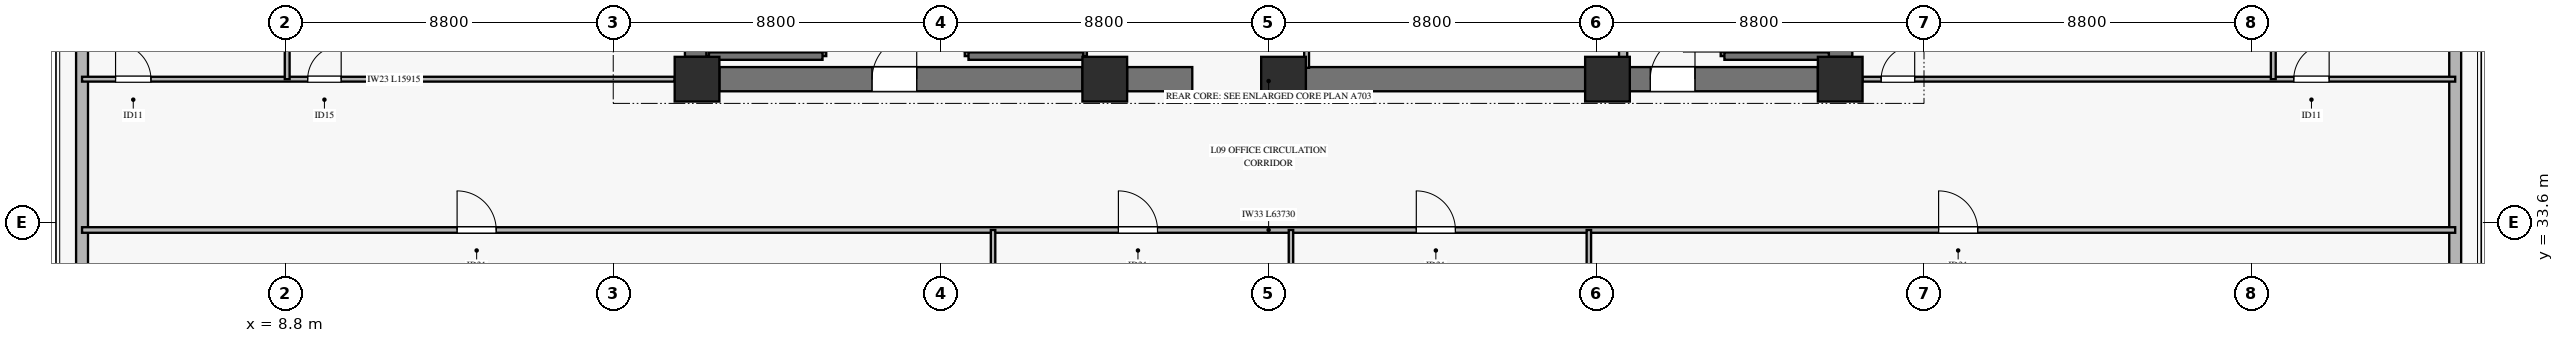
"""IFC4 building model, lengths in metres.
Left out: names, types, materials, properties, quantities, classifications, styles, units other than length and angle.
Written with IfcOpenShell. Run it as: python <this file> out.ifc"""

import sys

from ifc_helpers import new_model, si_unit, direction, frame, frame_2d, origin, origin_2d, place, context, subcontext, project, spatial, rectangle, extrude, source, transform, mapped, element, fill, save


model = new_model("IFC4")
c1 = context("Model", 3, precision=1e-05, world=origin(), true_north=direction((0.0, 1.0)))
c2 = subcontext(c1, "Body", "Model", "MODEL_VIEW")
j1 = project(units=[si_unit("LENGTHUNIT", "METRE"), si_unit("PLANEANGLEUNIT", "RADIAN")], contexts=[c1])
p1 = place(None, origin())
s1 = spatial("IfcSite", under=j1, at=p1, CompositionType="ELEMENT")
p2 = place(p1, origin())
s2 = spatial("IfcBuilding", under=s1, at=p2, CompositionType="ELEMENT")
p3 = place(p2, frame((0.0, 0.0, 37.1)))
s3 = spatial("IfcBuildingStorey", under=s2, at=p3, CompositionType="ELEMENT", Elevation=37.1)
m1 = source(origin(), c2, "Body", "SweptSolid", [
    extrude(rectangle(XDim=1.2, YDim=1.2, at=origin_2d()), origin(), (0.0, 0.0, 1.0), 3.68),
])
for number, where, z_axis, x_axis in (
    (1, (19.85, 37.45, 0.0), (0.0, 0.0, 1.0), (1.0, 0.0, 0.0)),
    (2, (30.8, 37.45, 0.0), (0.0, 0.0, 1.0), (1.0, 0.0, 0.0)),
    (3, (35.6, 37.45, 0.0), (0.0, 0.0, 1.0), (1.0, 0.0, 0.0)),
    (4, (44.3, 37.45, 0.0), (0.0, 0.0, 1.0), (1.0, 0.0, 0.0)),
    (5, (50.55, 37.45, 0.0), (0.0, 0.0, 1.0), (1.0, 0.0, 0.0)),
):
    element("IfcColumn", number, at=place(p3, frame(where, z_axis=z_axis, x_axis=x_axis)), inside=s3, PredefinedType="PILASTER", context=c2, shape_type="MappedRepresentation", body=[
        mapped(m1, transform((0.0, 0.0, 0.0), x_axis=(1.0, 0.0, 0.0), y_axis=(0.0, 1.0, 0.0), z_axis=(0.0, 0.0, 1.0), scale=1.0)),
    ])
p4 = place(p3, frame((20.45, 37.45, 0.0), z_axis=(0.0, 0.0, 1.0), x_axis=(1.0, 0.0, 0.0)))
e6 = element("IfcWall", 6, at=p4, inside=s3, PredefinedType="SHEAR", context=c2, shape_type="SweptSolid", body=[
    extrude(rectangle(XDim=9.75, YDim=0.65, at=frame_2d((4.875, 0.0))), origin(), (0.0, 0.0, 1.0), 3.68),
])
p5 = place(p4, frame((4.1, 0.0, 0.0)))
e7 = element("IfcOpeningElement", 7, at=p5, cuts=e6, PredefinedType="OPENING", context=c2, shape_type="SweptSolid", body=[
    extrude(rectangle(XDim=1.2, YDim=2.15, at=frame_2d((0.6, 1.075))), frame((0.0, 0.335, 0.0), z_axis=(0.0, -1.0, 0.0), x_axis=(1.0, 0.0, 0.0)), (0.0, 0.0, 1.0), 0.67),
])
p6 = place(p3, frame((31.4, 37.45, 0.0), z_axis=(0.0, 0.0, 1.0), x_axis=(1.0, 0.0, 0.0)))
e8 = element("IfcWall", 8, at=p6, inside=s3, PredefinedType="SHEAR", context=c2, shape_type="SweptSolid", body=[
    extrude(rectangle(XDim=1.75, YDim=0.65, at=frame_2d((0.875, 0.0))), origin(), (0.0, 0.0, 1.0), 3.68),
])
p7 = place(p3, frame((36.2, 37.45, 0.0), z_axis=(0.0, 0.0, 1.0), x_axis=(1.0, 0.0, 0.0)))
e9 = element("IfcWall", 9, at=p7, inside=s3, PredefinedType="SHEAR", context=c2, shape_type="SweptSolid", body=[
    extrude(rectangle(XDim=7.5, YDim=0.65, at=frame_2d((3.75, 0.0))), origin(), (0.0, 0.0, 1.0), 3.68),
])
p8 = place(p3, frame((44.9, 37.45, 0.0), z_axis=(0.0, 0.0, 1.0), x_axis=(1.0, 0.0, 0.0)))
e10 = element("IfcWall", 10, at=p8, inside=s3, PredefinedType="SHEAR", context=c2, shape_type="SweptSolid", body=[
    extrude(rectangle(XDim=5.05, YDim=0.65, at=frame_2d((2.525, 0.0))), origin(), (0.0, 0.0, 1.0), 3.68),
])
p9 = place(p8, frame((0.55, 0.0, 0.0)))
e11 = element("IfcOpeningElement", 11, at=p9, cuts=e10, PredefinedType="OPENING", context=c2, shape_type="SweptSolid", body=[
    extrude(rectangle(XDim=1.2, YDim=2.15, at=frame_2d((0.6, 1.075))), frame((0.0, 0.335, 0.0), z_axis=(0.0, -1.0, 0.0), x_axis=(1.0, 0.0, 0.0)), (0.0, 0.0, 1.0), 0.67),
])
for number, where, z_axis, x_axis in (
    (12, (19.85, 38.05, 0.0), (0.0, 0.0, 1.0), (0.0, 1.0, 0.0)),
    (13, (50.55, 38.05, 0.0), (0.0, 0.0, 1.0), (0.0, 1.0, 0.0)),
):
    element("IfcWall", number, at=place(p3, frame(where, z_axis=z_axis, x_axis=x_axis)), inside=s3, PredefinedType="SHEAR", context=c2, shape_type="SweptSolid", body=[
        extrude(rectangle(XDim=7.9, YDim=0.65, at=frame_2d((3.95, 0.0))), origin(), (0.0, 0.0, 1.0), 3.68),
    ])
p10 = place(p3, frame((3.335, 25.513, 0.0), z_axis=(0.0, 0.0, 1.0), x_axis=(0.0, 1.0, 0.0)))
e14 = element("IfcWall", 14, at=p10, inside=s3, PredefinedType="SOLIDWALL", context=c2, shape_type="SweptSolid", body=[
    extrude(rectangle(XDim=17.413, YDim=0.32, at=frame_2d((8.707, 0.0))), origin(), (0.0, 0.0, 1.0), 3.16),
])
p11 = place(p10, frame((4.356, 0.0, 0.45)))
e15 = element("IfcOpeningElement", 15, at=p11, cuts=e14, PredefinedType="OPENING", context=c2, shape_type="SweptSolid", body=[
    extrude(rectangle(XDim=2.4, YDim=2.1, at=frame_2d((1.2, 1.05))), frame((0.0, 0.17, 0.0), z_axis=(0.0, -1.0, 0.0), x_axis=(1.0, 0.0, 0.0)), (0.0, 0.0, 1.0), 0.34),
])
p12 = place(p3, frame((67.065, 25.513, 0.0), z_axis=(0.0, 0.0, 1.0), x_axis=(0.0, 1.0, 0.0)))
e16 = element("IfcWall", 16, at=p12, inside=s3, PredefinedType="SOLIDWALL", context=c2, shape_type="SweptSolid", body=[
    extrude(rectangle(XDim=17.413, YDim=0.32, at=frame_2d((8.707, 0.0))), origin(), (0.0, 0.0, 1.0), 3.16),
])
p13 = place(p12, frame((4.356, 0.0, 0.45)))
e17 = element("IfcOpeningElement", 17, at=p13, cuts=e16, PredefinedType="OPENING", context=c2, shape_type="SweptSolid", body=[
    extrude(rectangle(XDim=2.4, YDim=2.1, at=frame_2d((1.2, 1.05))), frame((0.0, 0.17, 0.0), z_axis=(0.0, -1.0, 0.0), x_axis=(1.0, 0.0, 0.0)), (0.0, 0.0, 1.0), 0.34),
])
p14 = place(p3, frame((20.17, 38.07, 0.0), z_axis=(0.0, 0.0, 1.0), x_axis=(0.0, 1.0, 0.0)))
e18 = element("IfcWall", 18, at=p14, inside=s3, PredefinedType="SOLIDWALL", context=c2, shape_type="SweptSolid", body=[
    extrude(rectangle(XDim=7.25, YDim=0.14, at=frame_2d((3.625, 0.0))), origin(), (0.0, 0.0, 1.0), 3.9),
])
p15 = place(p3, frame((23.22, 38.07, 0.0), z_axis=(0.0, 0.0, 1.0), x_axis=(0.0, 1.0, 0.0)))
e19 = element("IfcWall", 19, at=p15, inside=s3, PredefinedType="SOLIDWALL", context=c2, shape_type="SweptSolid", body=[
    extrude(rectangle(XDim=7.25, YDim=0.2, at=frame_2d((3.625, 0.0))), origin(), (0.0, 0.0, 1.0), 3.9),
])
p16 = place(p15, frame((0.11, 0.0, 0.0)))
e20 = element("IfcOpeningElement", 20, at=p16, cuts=e19, PredefinedType="OPENING", context=c2, shape_type="SweptSolid", body=[
    extrude(rectangle(XDim=1.1, YDim=2.15, at=frame_2d((0.55, 1.075))), frame((0.0, 0.11, 0.0), z_axis=(0.0, -1.0, 0.0), x_axis=(1.0, 0.0, 0.0)), (0.0, 0.0, 1.0), 0.22),
])
p17 = place(p3, frame((20.17, 38.07, 0.0), z_axis=(0.0, 0.0, 1.0), x_axis=(1.0, 0.0, 0.0)))
e21 = element("IfcWall", 21, at=p17, inside=s3, PredefinedType="SOLIDWALL", context=c2, shape_type="SweptSolid", body=[
    extrude(rectangle(XDim=3.05, YDim=0.2, at=frame_2d((1.525, 0.0))), origin(), (0.0, 0.0, 1.0), 3.9),
])
p18 = place(p3, frame((27.14, 38.07, 0.0), z_axis=(0.0, 0.0, 1.0), x_axis=(0.0, 1.0, 0.0)))
e22 = element("IfcWall", 22, at=p18, inside=s3, PredefinedType="SOLIDWALL", context=c2, shape_type="SweptSolid", body=[
    extrude(rectangle(XDim=7.25, YDim=0.2, at=frame_2d((3.625, 0.0))), origin(), (0.0, 0.0, 1.0), 3.9),
])
p19 = place(p18, frame((0.11, 0.0, 0.0)))
e23 = element("IfcOpeningElement", 23, at=p19, cuts=e22, PredefinedType="OPENING", context=c2, shape_type="SweptSolid", body=[
    extrude(rectangle(XDim=1.1, YDim=2.15, at=frame_2d((0.55, 1.075))), frame((0.0, 0.11, 0.0), z_axis=(0.0, -1.0, 0.0), x_axis=(1.0, 0.0, 0.0)), (0.0, 0.0, 1.0), 0.22),
])
p20 = place(p3, frame((30.22, 38.07, 0.0), z_axis=(0.0, 0.0, 1.0), x_axis=(0.0, 1.0, 0.0)))
e24 = element("IfcWall", 24, at=p20, inside=s3, PredefinedType="SOLIDWALL", context=c2, shape_type="SweptSolid", body=[
    extrude(rectangle(XDim=7.25, YDim=0.2, at=frame_2d((3.625, 0.0))), origin(), (0.0, 0.0, 1.0), 3.9),
])
p21 = place(p3, frame((27.14, 38.07, 0.0), z_axis=(0.0, 0.0, 1.0), x_axis=(1.0, 0.0, 0.0)))
e25 = element("IfcWall", 25, at=p21, inside=s3, PredefinedType="SOLIDWALL", context=c2, shape_type="SweptSolid", body=[
    extrude(rectangle(XDim=3.08, YDim=0.2, at=frame_2d((1.54, 0.0))), origin(), (0.0, 0.0, 1.0), 3.9),
])
p22 = place(p3, frame((47.44, 38.07, 0.0), z_axis=(0.0, 0.0, 1.0), x_axis=(0.0, 1.0, 0.0)))
e26 = element("IfcWall", 26, at=p22, inside=s3, PredefinedType="SOLIDWALL", context=c2, shape_type="SweptSolid", body=[
    extrude(rectangle(XDim=7.25, YDim=0.2, at=frame_2d((3.625, 0.0))), origin(), (0.0, 0.0, 1.0), 3.9),
])
p23 = place(p22, frame((0.11, 0.0, 0.0)))
e27 = element("IfcOpeningElement", 27, at=p23, cuts=e26, PredefinedType="OPENING", context=c2, shape_type="SweptSolid", body=[
    extrude(rectangle(XDim=1.1, YDim=2.15, at=frame_2d((0.55, 1.075))), frame((0.0, 0.11, 0.0), z_axis=(0.0, -1.0, 0.0), x_axis=(1.0, 0.0, 0.0)), (0.0, 0.0, 1.0), 0.22),
])
p24 = place(p3, frame((47.44, 38.07, 0.0), z_axis=(0.0, 0.0, 1.0), x_axis=(1.0, 0.0, 0.0)))
e28 = element("IfcWall", 28, at=p24, inside=s3, PredefinedType="SOLIDWALL", context=c2, shape_type="SweptSolid", body=[
    extrude(rectangle(XDim=2.805, YDim=0.2, at=frame_2d((1.403, 0.0))), origin(), (0.0, 0.0, 1.0), 3.9),
])
p25 = place(p3, frame((44.72, 37.755, 0.0), z_axis=(0.0, 0.0, 1.0), x_axis=(0.0, 1.0, 0.0)))
e29 = element("IfcWall", 29, at=p25, inside=s3, PredefinedType="SOLIDWALL", context=c2, shape_type="SweptSolid", body=[
    extrude(rectangle(XDim=7.465, YDim=0.22, at=frame_2d((3.732, 0.0))), origin(), (0.0, 0.0, 1.0), 3.68),
])
p26 = place(p3, frame((36.22, 37.755, 0.0), z_axis=(0.0, 0.0, 1.0), x_axis=(0.0, 1.0, 0.0)))
e30 = element("IfcWall", 30, at=p26, inside=s3, PredefinedType="PARTITIONING", context=c2, shape_type="SweptSolid", body=[
    extrude(rectangle(XDim=2.165, YDim=0.13, at=frame_2d((1.083, 0.0))), origin(), (0.0, 0.0, 1.0), 3.68),
])
p27 = place(p26, frame((0.855, 0.0, 0.0)))
e31 = element("IfcOpeningElement", 31, at=p27, cuts=e30, PredefinedType="OPENING", context=c2, shape_type="SweptSolid", body=[
    extrude(rectangle(XDim=0.9, YDim=2.1, at=frame_2d((0.45, 1.05))), frame((0.0, 0.075, 0.0), z_axis=(0.0, -1.0, 0.0), x_axis=(1.0, 0.0, 0.0)), (0.0, 0.0, 1.0), 0.15),
])
p28 = place(p3, frame((3.335, 33.4, 0.0), z_axis=(0.0, 0.0, 1.0), x_axis=(1.0, 0.0, 0.0)))
e32 = element("IfcWall", 32, at=p28, inside=s3, PredefinedType="PARTITIONING", context=c2, shape_type="SweptSolid", body=[
    extrude(rectangle(XDim=63.73, YDim=0.15, at=frame_2d((31.865, 0.0))), origin(), (0.0, 0.0, 1.0), 2.765),
])
p29 = place(p28, frame((10.072, 0.0, 0.0)))
e33 = element("IfcOpeningElement", 33, at=p29, cuts=e32, PredefinedType="OPENING", context=c2, shape_type="SweptSolid", body=[
    extrude(rectangle(XDim=1.05, YDim=2.15, at=frame_2d((0.525, 1.075))), frame((0.0, 0.085, 0.0), z_axis=(0.0, -1.0, 0.0), x_axis=(1.0, 0.0, 0.0)), (0.0, 0.0, 1.0), 0.17),
])
p30 = place(p28, frame((27.831, 0.0, 0.0)))
e34 = element("IfcOpeningElement", 34, at=p30, cuts=e32, PredefinedType="OPENING", context=c2, shape_type="SweptSolid", body=[
    extrude(rectangle(XDim=1.05, YDim=2.15, at=frame_2d((0.525, 1.075))), frame((0.0, 0.085, 0.0), z_axis=(0.0, -1.0, 0.0), x_axis=(1.0, 0.0, 0.0)), (0.0, 0.0, 1.0), 0.17),
])
p31 = place(p28, frame((35.831, 0.0, 0.0)))
e35 = element("IfcOpeningElement", 35, at=p31, cuts=e32, PredefinedType="OPENING", context=c2, shape_type="SweptSolid", body=[
    extrude(rectangle(XDim=1.05, YDim=2.15, at=frame_2d((0.525, 1.075))), frame((0.0, 0.085, 0.0), z_axis=(0.0, -1.0, 0.0), x_axis=(1.0, 0.0, 0.0)), (0.0, 0.0, 1.0), 0.17),
])
p32 = place(p28, frame((49.857, 0.0, 0.0)))
e36 = element("IfcOpeningElement", 36, at=p32, cuts=e32, PredefinedType="OPENING", context=c2, shape_type="SweptSolid", body=[
    extrude(rectangle(XDim=1.05, YDim=2.15, at=frame_2d((0.525, 1.075))), frame((0.0, 0.085, 0.0), z_axis=(0.0, -1.0, 0.0), x_axis=(1.0, 0.0, 0.0)), (0.0, 0.0, 1.0), 0.17),
])
for number, where, z_axis, x_axis in (
    (37, (27.8, 3.827, 0.0), (0.0, 0.0, 1.0), (0.0, 1.0, 0.0)),
    (38, (35.8, 3.827, 0.0), (0.0, 0.0, 1.0), (0.0, 1.0, 0.0)),
):
    element("IfcWall", number, at=place(p3, frame(where, z_axis=z_axis, x_axis=x_axis)), inside=s3, PredefinedType="PARTITIONING", context=c2, shape_type="SweptSolid", body=[
        extrude(rectangle(XDim=29.573, YDim=0.12, at=frame_2d((14.787, 0.0))), origin(), (0.0, 0.0, 1.0), 3.165),
    ])
p33 = place(p3, frame((43.8, 3.827, 0.0), z_axis=(0.0, 0.0, 1.0), x_axis=(0.0, 1.0, 0.0)))
e39 = element("IfcWall", 39, at=p33, inside=s3, PredefinedType="PARTITIONING", context=c2, shape_type="SweptSolid", body=[
    extrude(rectangle(XDim=29.573, YDim=0.12, at=frame_2d((14.787, 0.0))), origin(), (0.0, 0.0, 1.0), 3.215),
])
p34 = place(p3, frame((3.335, 37.45, 0.0), z_axis=(0.0, 0.0, 1.0), x_axis=(1.0, 0.0, 0.0)))
e40 = element("IfcWall", 40, at=p34, inside=s3, PredefinedType="PARTITIONING", context=c2, shape_type="SweptSolid", body=[
    extrude(rectangle(XDim=15.915, YDim=0.13, at=frame_2d((7.958, 0.0))), origin(), (0.0, 0.0, 1.0), 3.165),
])
p35 = place(p34, frame((0.9, 0.0, 0.0)))
e41 = element("IfcOpeningElement", 41, at=p35, cuts=e40, PredefinedType="OPENING", context=c2, shape_type="SweptSolid", body=[
    extrude(rectangle(XDim=0.95, YDim=2.1, at=frame_2d((0.475, 1.05))), frame((0.0, 0.075, 0.0), z_axis=(0.0, -1.0, 0.0), x_axis=(1.0, 0.0, 0.0)), (0.0, 0.0, 1.0), 0.15),
])
p36 = place(p34, frame((6.059, 0.0, 0.0)))
e42 = element("IfcOpeningElement", 42, at=p36, cuts=e40, PredefinedType="OPENING", context=c2, shape_type="SweptSolid", body=[
    extrude(rectangle(XDim=0.9, YDim=2.1, at=frame_2d((0.45, 1.05))), frame((0.0, 0.075, 0.0), z_axis=(0.0, -1.0, 0.0), x_axis=(1.0, 0.0, 0.0)), (0.0, 0.0, 1.0), 0.15),
])
p37 = place(p3, frame((8.844, 37.45, 0.0), z_axis=(0.0, 0.0, 1.0), x_axis=(0.0, 1.0, 0.0)))
e43 = element("IfcWall", 43, at=p37, inside=s3, PredefinedType="PARTITIONING", context=c2, shape_type="SweptSolid", body=[
    extrude(rectangle(XDim=8.8, YDim=0.13, at=frame_2d((4.4, 0.0))), origin(), (0.0, 0.0, 1.0), 3.68),
])
p38 = place(p3, frame((51.15, 37.45, 0.0), z_axis=(0.0, 0.0, 1.0), x_axis=(1.0, 0.0, 0.0)))
e44 = element("IfcWall", 44, at=p38, inside=s3, PredefinedType="PARTITIONING", context=c2, shape_type="SweptSolid", body=[
    extrude(rectangle(XDim=15.915, YDim=0.13, at=frame_2d((7.958, 0.0))), origin(), (0.0, 0.0, 1.0), 3.165),
])
p39 = place(p38, frame((0.5, 0.0, 0.0)))
e45 = element("IfcOpeningElement", 45, at=p39, cuts=e44, PredefinedType="OPENING", context=c2, shape_type="SweptSolid", body=[
    extrude(rectangle(XDim=0.9, YDim=2.1, at=frame_2d((0.45, 1.05))), frame((0.0, 0.075, 0.0), z_axis=(0.0, -1.0, 0.0), x_axis=(1.0, 0.0, 0.0)), (0.0, 0.0, 1.0), 0.15),
])
p40 = place(p38, frame((11.58, 0.0, 0.0)))
e46 = element("IfcOpeningElement", 46, at=p40, cuts=e44, PredefinedType="OPENING", context=c2, shape_type="SweptSolid", body=[
    extrude(rectangle(XDim=0.95, YDim=2.1, at=frame_2d((0.475, 1.05))), frame((0.0, 0.075, 0.0), z_axis=(0.0, -1.0, 0.0), x_axis=(1.0, 0.0, 0.0)), (0.0, 0.0, 1.0), 0.15),
])
p41 = place(p3, frame((62.18, 37.45, 0.0), z_axis=(0.0, 0.0, 1.0), x_axis=(0.0, 1.0, 0.0)))
e47 = element("IfcWall", 47, at=p41, inside=s3, PredefinedType="PARTITIONING", context=c2, shape_type="SweptSolid", body=[
    extrude(rectangle(XDim=8.8, YDim=0.13, at=frame_2d((4.4, 0.0))), origin(), (0.0, 0.0, 1.0), 3.68),
])
m2 = source(origin(), c2, "Body", "SweptSolid", [
    extrude(rectangle(XDim=1.2, YDim=2.15, at=frame_2d((0.6, 1.075))), frame((0.0, 0.025, 0.0), z_axis=(0.0, -1.0, 0.0), x_axis=(1.0, 0.0, 0.0)), (0.0, 0.0, 1.0), 0.05),
])
p42 = place(p5, origin())
e48 = element("IfcDoor", 48, at=p42, inside=s3, OperationType="SINGLE_SWING_RIGHT", PredefinedType="DOOR", context=c2, shape_type="MappedRepresentation", body=[
    mapped(m2, transform((0.0, 0.0, 0.0), x_axis=(1.0, 0.0, 0.0), y_axis=(0.0, 1.0, 0.0), z_axis=(0.0, 0.0, 1.0), scale=1.0)),
])
fill(e7, e48)
p43 = place(p9, origin())
e49 = element("IfcDoor", 49, at=p43, inside=s3, OperationType="SINGLE_SWING_RIGHT", PredefinedType="DOOR", context=c2, shape_type="MappedRepresentation", body=[
    mapped(m2, transform((0.0, 0.0, 0.0), x_axis=(1.0, 0.0, 0.0), y_axis=(0.0, 1.0, 0.0), z_axis=(0.0, 0.0, 1.0), scale=1.0)),
])
fill(e11, e49)
m3 = source(origin(), c2, "Body", "SweptSolid", [
    extrude(rectangle(XDim=1.05, YDim=2.15, at=frame_2d((0.525, 1.075))), frame((0.0, 0.025, 0.0), z_axis=(0.0, -1.0, 0.0), x_axis=(1.0, 0.0, 0.0)), (0.0, 0.0, 1.0), 0.05),
])
p44 = place(p29, origin())
e50 = element("IfcDoor", 50, at=p44, inside=s3, OperationType="SINGLE_SWING_LEFT", PredefinedType="DOOR", context=c2, shape_type="MappedRepresentation", body=[
    mapped(m3, transform((0.0, 0.0, 0.0), x_axis=(1.0, 0.0, 0.0), y_axis=(0.0, 1.0, 0.0), z_axis=(0.0, 0.0, 1.0), scale=1.0)),
])
fill(e33, e50)
p45 = place(p30, origin())
e51 = element("IfcDoor", 51, at=p45, inside=s3, OperationType="SINGLE_SWING_LEFT", PredefinedType="DOOR", context=c2, shape_type="MappedRepresentation", body=[
    mapped(m3, transform((0.0, 0.0, 0.0), x_axis=(1.0, 0.0, 0.0), y_axis=(0.0, 1.0, 0.0), z_axis=(0.0, 0.0, 1.0), scale=1.0)),
])
fill(e34, e51)
p46 = place(p31, origin())
e52 = element("IfcDoor", 52, at=p46, inside=s3, OperationType="SINGLE_SWING_LEFT", PredefinedType="DOOR", context=c2, shape_type="MappedRepresentation", body=[
    mapped(m3, transform((0.0, 0.0, 0.0), x_axis=(1.0, 0.0, 0.0), y_axis=(0.0, 1.0, 0.0), z_axis=(0.0, 0.0, 1.0), scale=1.0)),
])
fill(e35, e52)
p47 = place(p32, origin())
e53 = element("IfcDoor", 53, at=p47, inside=s3, OperationType="SINGLE_SWING_LEFT", PredefinedType="DOOR", context=c2, shape_type="MappedRepresentation", body=[
    mapped(m3, transform((0.0, 0.0, 0.0), x_axis=(1.0, 0.0, 0.0), y_axis=(0.0, 1.0, 0.0), z_axis=(0.0, 0.0, 1.0), scale=1.0)),
])
fill(e36, e53)
m4 = source(origin(), c2, "Body", "SweptSolid", [
    extrude(rectangle(XDim=0.95, YDim=2.1, at=frame_2d((0.475, 1.05))), frame((0.0, 0.025, 0.0), z_axis=(0.0, -1.0, 0.0), x_axis=(1.0, 0.0, 0.0)), (0.0, 0.0, 1.0), 0.05),
])
p48 = place(p35, origin())
e54 = element("IfcDoor", 54, at=p48, inside=s3, OperationType="SINGLE_SWING_LEFT", PredefinedType="DOOR", context=c2, shape_type="MappedRepresentation", body=[
    mapped(m4, transform((0.0, 0.0, 0.0), x_axis=(1.0, 0.0, 0.0), y_axis=(0.0, 1.0, 0.0), z_axis=(0.0, 0.0, 1.0), scale=1.0)),
])
fill(e41, e54)
m5 = source(origin(), c2, "Body", "SweptSolid", [
    extrude(rectangle(XDim=0.9, YDim=2.1, at=frame_2d((0.45, 1.05))), frame((0.0, 0.025, 0.0), z_axis=(0.0, -1.0, 0.0), x_axis=(1.0, 0.0, 0.0)), (0.0, 0.0, 1.0), 0.05),
])
p49 = place(p36, origin())
e55 = element("IfcDoor", 55, at=p49, inside=s3, OperationType="SINGLE_SWING_RIGHT", PredefinedType="DOOR", context=c2, shape_type="MappedRepresentation", body=[
    mapped(m5, transform((0.0, 0.0, 0.0), x_axis=(1.0, 0.0, 0.0), y_axis=(0.0, 1.0, 0.0), z_axis=(0.0, 0.0, 1.0), scale=1.0)),
])
fill(e42, e55)
p50 = place(p39, origin())
e56 = element("IfcDoor", 56, at=p50, inside=s3, OperationType="SINGLE_SWING_RIGHT", PredefinedType="DOOR", context=c2, shape_type="MappedRepresentation", body=[
    mapped(m5, transform((0.0, 0.0, 0.0), x_axis=(1.0, 0.0, 0.0), y_axis=(0.0, 1.0, 0.0), z_axis=(0.0, 0.0, 1.0), scale=1.0)),
])
fill(e45, e56)
p51 = place(p40, origin())
e57 = element("IfcDoor", 57, at=p51, inside=s3, OperationType="SINGLE_SWING_RIGHT", PredefinedType="DOOR", context=c2, shape_type="MappedRepresentation", body=[
    mapped(m4, transform((0.0, 0.0, 0.0), x_axis=(1.0, 0.0, 0.0), y_axis=(0.0, 1.0, 0.0), z_axis=(0.0, 0.0, 1.0), scale=1.0)),
])
fill(e46, e57)
save(model, sys.argv[1])
